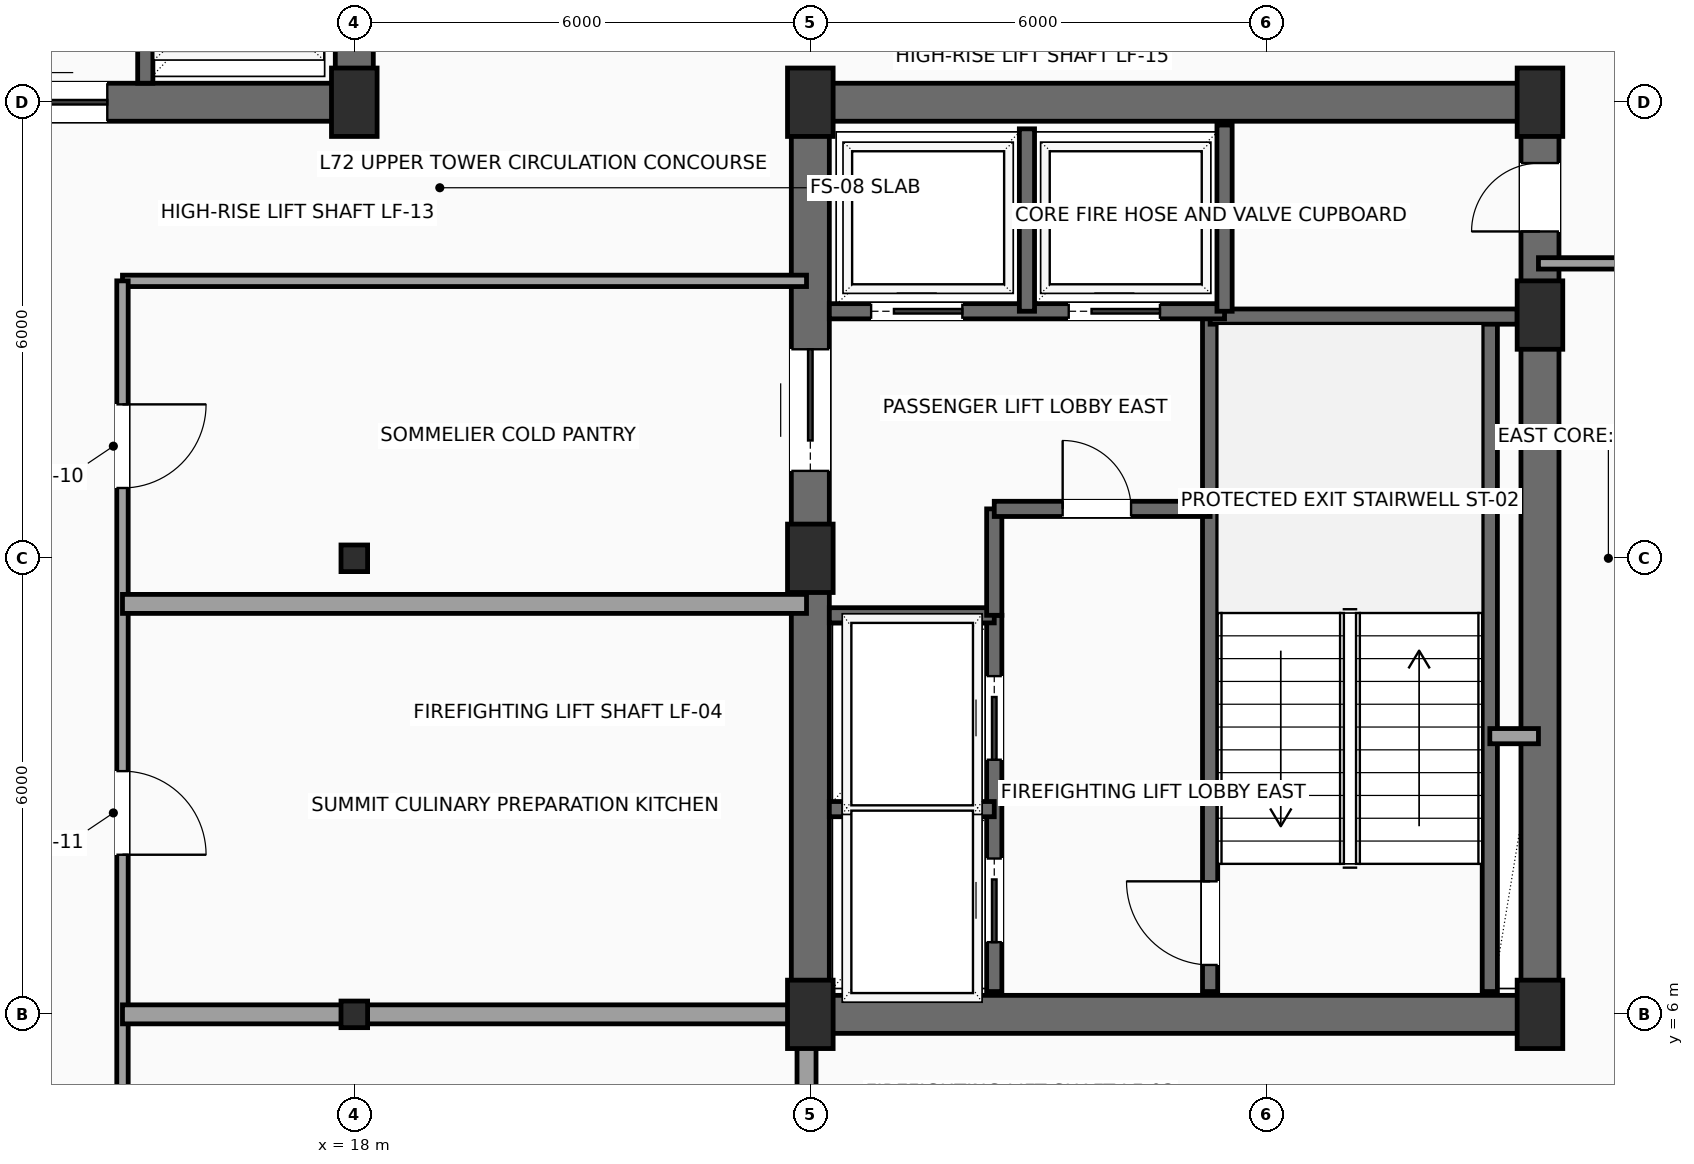
"""IFC4 building model, lengths in metres.
Left out: names, types, materials, properties, quantities, classifications, styles, units other than length and angle.
Written with IfcOpenShell. Run it as: python <this file> out.ifc"""

import sys

from ifc_helpers import new_model, si_unit, direction, frame, frame_2d, origin, origin_2d, place, context, subcontext, project, spatial, rectangle, hollow_rectangle, extrude, element, fill, save


model = new_model("IFC4")
c1 = context("Model", 3, precision=1e-05, world=origin(), true_north=direction((0.0, 1.0)))
c2 = subcontext(c1, "Body", "Model", "MODEL_VIEW")
j1 = project(units=[si_unit("LENGTHUNIT", "METRE"), si_unit("PLANEANGLEUNIT", "RADIAN")], contexts=[c1])
p1 = place(None, origin())
s1 = spatial("IfcSite", under=j1, at=p1, CompositionType="ELEMENT")
p2 = place(p1, origin())
s2 = spatial("IfcBuilding", under=s1, at=p2, CompositionType="ELEMENT")
p3 = place(p2, frame((0.0, 0.0, 285.2)))
s3 = spatial("IfcBuildingStorey", under=s2, at=p3, CompositionType="ELEMENT", Elevation=285.2)
for number, where, z_axis, x_axis in (
    (1, (18.0, 18.0, 0.0), (0.0, 0.0, 1.0), (1.0, 0.0, 0.0)),
    (2, (24.0, 6.0, 0.0), (0.0, 0.0, 1.0), (1.0, 0.0, 0.0)),
    (3, (24.0, 12.0, 0.0), (0.0, 0.0, 1.0), (1.0, 0.0, 0.0)),
    (4, (24.0, 18.0, 0.0), (0.0, 0.0, 1.0), (1.0, 0.0, 0.0)),
    (5, (33.6, 6.0, 0.0), (0.0, 0.0, 1.0), (1.0, 0.0, 0.0)),
    (6, (33.6, 15.2, 0.0), (0.0, 0.0, 1.0), (1.0, 0.0, 0.0)),
    (7, (33.6, 18.0, 0.0), (0.0, 0.0, 1.0), (1.0, 0.0, 0.0)),
):
    element("IfcColumn", number, at=place(p3, frame(where, z_axis=z_axis, x_axis=x_axis)), inside=s3, PredefinedType="COLUMN", context=c2, shape_type="SweptSolid", body=[
        extrude(rectangle(XDim=0.6, YDim=0.9, at=origin_2d()), origin(), (0.0, 0.0, 1.0), 3.5),
    ])
for number, where, z_axis, x_axis in (
    (8, (18.0, 6.0, 0.0), (0.0, 0.0, 1.0), (1.0, 0.0, 0.0)),
    (9, (18.0, 12.0, 0.0), (0.0, 0.0, 1.0), (1.0, 0.0, 0.0)),
):
    element("IfcColumn", number, at=place(p3, frame(where, z_axis=z_axis, x_axis=x_axis)), inside=s3, PredefinedType="COLUMN", context=c2, shape_type="SweptSolid", body=[
        extrude(hollow_rectangle(XDim=0.35, YDim=0.35, WallThickness=0.016, InnerFilletRadius=0.016, OuterFilletRadius=0.032, at=origin_2d()), origin(), (0.0, 0.0, 1.0), 3.5),
    ])
p4 = place(p3, frame((6.0, 18.0, 0.0), z_axis=(0.0, 0.0, 1.0), x_axis=(1.0, 0.0, 0.0)))
e10 = element("IfcWall", 10, at=p4, inside=s3, PredefinedType="SHEAR", context=c2, shape_type="SweptSolid", body=[
    extrude(rectangle(XDim=12.0, YDim=0.5, at=frame_2d((6.0, 0.0))), origin(), (0.0, 0.0, 1.0), 3.3),
])
p5 = place(p4, frame((7.15, 0.0, 0.0)))
e11 = element("IfcOpeningElement", 11, at=p5, cuts=e10, PredefinedType="OPENING", context=c2, shape_type="SweptSolid", body=[
    extrude(rectangle(XDim=1.6, YDim=2.3, at=frame_2d((0.8, 1.15))), frame((0.0, 0.26, 0.0), z_axis=(0.0, -1.0, 0.0), x_axis=(1.0, 0.0, 0.0)), (0.0, 0.0, 1.0), 0.52),
])
for number, where, z_axis, x_axis in (
    (12, (18.0, 18.0, 0.0), (0.0, 0.0, 1.0), (0.0, 1.0, 0.0)),
    (13, (24.0, 6.0, 0.0), (0.0, 0.0, 1.0), (1.0, 0.0, 0.0)),
    (14, (24.0, 18.0, 0.0), (0.0, 0.0, 1.0), (1.0, 0.0, 0.0)),
):
    element("IfcWall", number, at=place(p3, frame(where, z_axis=z_axis, x_axis=x_axis)), inside=s3, PredefinedType="SHEAR", context=c2, shape_type="SweptSolid", body=[
        extrude(rectangle(XDim=9.6, YDim=0.5, at=frame_2d((4.8, 0.0))), origin(), (0.0, 0.0, 1.0), 3.3),
    ])
p6 = place(p3, frame((24.0, 6.0, 0.0), z_axis=(0.0, 0.0, 1.0), x_axis=(0.0, 1.0, 0.0)))
e15 = element("IfcWall", 15, at=p6, inside=s3, PredefinedType="SHEAR", context=c2, shape_type="SweptSolid", body=[
    extrude(rectangle(XDim=12.0, YDim=0.5, at=frame_2d((6.0, 0.0))), origin(), (0.0, 0.0, 1.0), 3.3),
])
p7 = place(p6, frame((7.15, 0.0, 0.0)))
e16 = element("IfcOpeningElement", 16, at=p7, cuts=e15, PredefinedType="OPENING", context=c2, shape_type="SweptSolid", body=[
    extrude(rectangle(XDim=1.6, YDim=2.3, at=frame_2d((0.8, 1.15))), frame((0.0, 0.26, 0.0), z_axis=(0.0, -1.0, 0.0), x_axis=(1.0, 0.0, 0.0)), (0.0, 0.0, 1.0), 0.52),
])
p8 = place(p3, frame((33.6, 6.0, 0.0), z_axis=(0.0, 0.0, 1.0), x_axis=(0.0, 1.0, 0.0)))
e17 = element("IfcWall", 17, at=p8, inside=s3, PredefinedType="SHEAR", context=c2, shape_type="SweptSolid", body=[
    extrude(rectangle(XDim=12.0, YDim=0.5, at=frame_2d((6.0, 0.0))), origin(), (0.0, 0.0, 1.0), 3.3),
])
p9 = place(p8, frame((10.3, 0.0, 0.0)))
e18 = element("IfcOpeningElement", 18, at=p9, cuts=e17, PredefinedType="OPENING", context=c2, shape_type="SweptSolid", body=[
    extrude(rectangle(XDim=0.9, YDim=2.15, at=frame_2d((0.45, 1.075))), frame((0.0, 0.26, 0.0), z_axis=(0.0, -1.0, 0.0), x_axis=(1.0, 0.0, 0.0)), (0.0, 0.0, 1.0), 0.52),
])
p10 = place(p3, frame((29.26, 6.3, 0.0), z_axis=(0.0, 0.0, 1.0), x_axis=(0.0, 1.0, 0.0)))
e19 = element("IfcWall", 19, at=p10, inside=s3, PredefinedType="SHEAR", context=c2, shape_type="SweptSolid", body=[
    extrude(rectangle(XDim=8.88, YDim=0.2, at=frame_2d((4.44, 0.0))), origin(), (0.0, 0.0, 1.0), 3.3),
])
p11 = place(p10, frame((0.35, 0.0, 0.0)))
e20 = element("IfcOpeningElement", 20, at=p11, cuts=e19, PredefinedType="OPENING", context=c2, shape_type="SweptSolid", body=[
    extrude(rectangle(XDim=1.1, YDim=2.2, at=frame_2d((0.55, 1.1))), frame((0.0, 0.11, 0.0), z_axis=(0.0, -1.0, 0.0), x_axis=(1.0, 0.0, 0.0)), (0.0, 0.0, 1.0), 0.22),
])
p12 = place(p3, frame((32.94, 6.3, 0.0), z_axis=(0.0, 0.0, 1.0), x_axis=(0.0, 1.0, 0.0)))
e21 = element("IfcWall", 21, at=p12, inside=s3, PredefinedType="SHEAR", context=c2, shape_type="SweptSolid", body=[
    extrude(rectangle(XDim=8.88, YDim=0.2, at=frame_2d((4.44, 0.0))), origin(), (0.0, 0.0, 1.0), 3.3),
])
p13 = place(p3, frame((29.26, 15.18, 0.0), z_axis=(0.0, 0.0, 1.0), x_axis=(1.0, 0.0, 0.0)))
e22 = element("IfcWall", 22, at=p13, inside=s3, PredefinedType="SHEAR", context=c2, shape_type="SweptSolid", body=[
    extrude(rectangle(XDim=4.04, YDim=0.2, at=frame_2d((2.02, 0.0))), origin(), (0.0, 0.0, 1.0), 3.3),
])
p14 = place(p3, frame((26.42, 6.3, 0.0), z_axis=(0.0, 0.0, 1.0), x_axis=(0.0, 1.0, 0.0)))
e23 = element("IfcWall", 23, at=p14, inside=s3, PredefinedType="SHEAR", context=c2, shape_type="SweptSolid", body=[
    extrude(rectangle(XDim=4.95, YDim=0.2, at=frame_2d((2.475, 0.0))), origin(), (0.0, 0.0, 1.0), 3.3),
])
p15 = place(p14, frame((0.65, 0.0, 0.0)))
e24 = element("IfcOpeningElement", 24, at=p15, cuts=e23, PredefinedType="OPENING", context=c2, shape_type="SweptSolid", body=[
    extrude(rectangle(XDim=1.1, YDim=2.2, at=frame_2d((0.55, 1.1))), frame((0.0, 0.11, 0.0), z_axis=(0.0, -1.0, 0.0), x_axis=(1.0, 0.0, 0.0)), (0.0, 0.0, 1.0), 0.22),
])
p16 = place(p14, frame((3.05, 0.0, 0.0)))
e25 = element("IfcOpeningElement", 25, at=p16, cuts=e23, PredefinedType="OPENING", context=c2, shape_type="SweptSolid", body=[
    extrude(rectangle(XDim=1.1, YDim=2.2, at=frame_2d((0.55, 1.1))), frame((0.0, 0.11, 0.0), z_axis=(0.0, -1.0, 0.0), x_axis=(1.0, 0.0, 0.0)), (0.0, 0.0, 1.0), 0.22),
])
for number, where, z_axis, x_axis in (
    (26, (24.25, 8.7, 0.0), (0.0, 0.0, 1.0), (1.0, 0.0, 0.0)),
    (27, (24.25, 11.25, 0.0), (0.0, 0.0, 1.0), (1.0, 0.0, 0.0)),
):
    element("IfcWall", number, at=place(p3, frame(where, z_axis=z_axis, x_axis=x_axis)), inside=s3, PredefinedType="SHEAR", context=c2, shape_type="SweptSolid", body=[
        extrude(rectangle(XDim=2.17, YDim=0.2, at=frame_2d((1.085, 0.0))), origin(), (0.0, 0.0, 1.0), 3.3),
    ])
p17 = place(p3, frame((26.42, 11.25, 0.0), z_axis=(0.0, 0.0, 1.0), x_axis=(0.0, 1.0, 0.0)))
e28 = element("IfcWall", 28, at=p17, inside=s3, PredefinedType="SHEAR", context=c2, shape_type="SweptSolid", body=[
    extrude(rectangle(XDim=1.4, YDim=0.2, at=frame_2d((0.7, 0.0))), origin(), (0.0, 0.0, 1.0), 3.3),
])
p18 = place(p3, frame((26.42, 12.65, 0.0), z_axis=(0.0, 0.0, 1.0), x_axis=(1.0, 0.0, 0.0)))
e29 = element("IfcWall", 29, at=p18, inside=s3, PredefinedType="SHEAR", context=c2, shape_type="SweptSolid", body=[
    extrude(rectangle(XDim=2.84, YDim=0.2, at=frame_2d((1.42, 0.0))), origin(), (0.0, 0.0, 1.0), 3.3),
])
p19 = place(p18, frame((0.9, 0.0, 0.0)))
e30 = element("IfcOpeningElement", 30, at=p19, cuts=e29, PredefinedType="OPENING", context=c2, shape_type="SweptSolid", body=[
    extrude(rectangle(XDim=0.9, YDim=2.15, at=frame_2d((0.45, 1.075))), frame((0.0, 0.11, 0.0), z_axis=(0.0, -1.0, 0.0), x_axis=(1.0, 0.0, 0.0)), (0.0, 0.0, 1.0), 0.22),
])
p20 = place(p3, frame((32.94, 9.66, 0.0), z_axis=(0.0, 0.0, 1.0), x_axis=(1.0, 0.0, 0.0)))
e31 = element("IfcWall", 31, at=p20, inside=s3, PredefinedType="SOLIDWALL", context=c2, shape_type="SweptSolid", body=[
    extrude(rectangle(XDim=0.64, YDim=0.2, at=frame_2d((0.32, 0.0))), origin(), (0.0, 0.0, 1.0), 3.3),
])
p21 = place(p3, frame((15.25, 18.25, 0.0), z_axis=(0.0, 0.0, 1.0), x_axis=(0.0, 1.0, 0.0)))
e32 = element("IfcWall", 32, at=p21, inside=s3, PredefinedType="SHEAR", context=c2, shape_type="SweptSolid", body=[
    extrude(rectangle(XDim=5.2, YDim=0.2, at=frame_2d((2.6, 0.0))), origin(), (0.0, 0.0, 1.0), 3.3),
])
p22 = place(p21, frame((0.55, 0.0, 0.0)))
e33 = element("IfcOpeningElement", 33, at=p22, cuts=e32, PredefinedType="OPENING", context=c2, shape_type="SweptSolid", body=[
    extrude(rectangle(XDim=1.2, YDim=2.2, at=frame_2d((0.6, 1.1))), frame((0.0, 0.11, 0.0), z_axis=(0.0, -1.0, 0.0), x_axis=(1.0, 0.0, 0.0)), (0.0, 0.0, 1.0), 0.22),
])
p23 = place(p21, frame((3.15, 0.0, 0.0)))
e34 = element("IfcOpeningElement", 34, at=p23, cuts=e32, PredefinedType="OPENING", context=c2, shape_type="SweptSolid", body=[
    extrude(rectangle(XDim=1.2, YDim=2.2, at=frame_2d((0.6, 1.1))), frame((0.0, 0.11, 0.0), z_axis=(0.0, -1.0, 0.0), x_axis=(1.0, 0.0, 0.0)), (0.0, 0.0, 1.0), 0.22),
])
p24 = place(p3, frame((24.25, 15.25, 0.0), z_axis=(0.0, 0.0, 1.0), x_axis=(1.0, 0.0, 0.0)))
e35 = element("IfcWall", 35, at=p24, inside=s3, PredefinedType="SHEAR", context=c2, shape_type="SweptSolid", body=[
    extrude(rectangle(XDim=5.2, YDim=0.2, at=frame_2d((2.6, 0.0))), origin(), (0.0, 0.0, 1.0), 3.3),
])
p25 = place(p24, frame((0.55, 0.0, 0.0)))
e36 = element("IfcOpeningElement", 36, at=p25, cuts=e35, PredefinedType="OPENING", context=c2, shape_type="SweptSolid", body=[
    extrude(rectangle(XDim=1.2, YDim=2.2, at=frame_2d((0.6, 1.1))), frame((0.0, 0.11, 0.0), z_axis=(0.0, -1.0, 0.0), x_axis=(1.0, 0.0, 0.0)), (0.0, 0.0, 1.0), 0.22),
])
p26 = place(p24, frame((3.15, 0.0, 0.0)))
e37 = element("IfcOpeningElement", 37, at=p26, cuts=e35, PredefinedType="OPENING", context=c2, shape_type="SweptSolid", body=[
    extrude(rectangle(XDim=1.2, YDim=2.2, at=frame_2d((0.6, 1.1))), frame((0.0, 0.11, 0.0), z_axis=(0.0, -1.0, 0.0), x_axis=(1.0, 0.0, 0.0)), (0.0, 0.0, 1.0), 0.22),
])
p27 = place(p3, frame((26.85, 15.25, 0.0), z_axis=(0.0, 0.0, 1.0), x_axis=(0.0, 1.0, 0.0)))
e38 = element("IfcWall", 38, at=p27, inside=s3, PredefinedType="SHEAR", context=c2, shape_type="SweptSolid", body=[
    extrude(rectangle(XDim=2.4, YDim=0.2, at=frame_2d((1.2, 0.0))), origin(), (0.0, 0.0, 1.0), 3.3),
])
p28 = place(p3, frame((29.45, 15.25, 0.0), z_axis=(0.0, 0.0, 1.0), x_axis=(0.0, 1.0, 0.0)))
e39 = element("IfcWall", 39, at=p28, inside=s3, PredefinedType="SHEAR", context=c2, shape_type="SweptSolid", body=[
    extrude(rectangle(XDim=2.45, YDim=0.2, at=frame_2d((1.225, 0.0))), origin(), (0.0, 0.0, 1.0), 3.3),
])
p29 = place(p3, frame((35.7, 15.88, 0.0), z_axis=(0.0, 0.0, 1.0), x_axis=(-1.0, 0.0, 0.0)))
e40 = element("IfcWall", 40, at=p29, inside=s3, PredefinedType="PARTITIONING", context=c2, shape_type="SweptSolid", body=[
    extrude(rectangle(XDim=2.12, YDim=0.15, at=frame_2d((1.06, 0.0))), origin(), (0.0, 0.0, 1.0), 3.3),
])
p30 = place(p3, frame((23.95, 15.65, 0.0), z_axis=(0.0, 0.0, 1.0), x_axis=(-1.0, 0.0, 0.0)))
e41 = element("IfcWall", 41, at=p30, inside=s3, PredefinedType="PARTITIONING", context=c2, shape_type="SweptSolid", body=[
    extrude(rectangle(XDim=9.0, YDim=0.15, at=frame_2d((4.5, 0.0))), origin(), (0.0, 0.0, 1.0), 3.3),
])
p31 = place(p3, frame((14.95, 15.65, 0.0), z_axis=(0.0, 0.0, 1.0), x_axis=(0.0, -1.0, 0.0)))
e42 = element("IfcWall", 42, at=p31, inside=s3, PredefinedType="PARTITIONING", context=c2, shape_type="SweptSolid", body=[
    extrude(rectangle(XDim=13.85, YDim=0.15, at=frame_2d((6.925, 0.0))), origin(), (0.0, 0.0, 1.0), 3.3),
])
p32 = place(p31, frame((11.25, 0.0, 0.0)))
e43 = element("IfcOpeningElement", 43, at=p32, cuts=e42, PredefinedType="OPENING", context=c2, shape_type="SweptSolid", body=[
    extrude(rectangle(XDim=1.1, YDim=2.25, at=frame_2d((0.55, 1.125))), frame((0.0, 0.085, 0.0), z_axis=(0.0, -1.0, 0.0), x_axis=(1.0, 0.0, 0.0)), (0.0, 0.0, 1.0), 0.17),
])
p33 = place(p31, frame((6.45, 0.0, 0.0)))
e44 = element("IfcOpeningElement", 44, at=p33, cuts=e42, PredefinedType="OPENING", context=c2, shape_type="SweptSolid", body=[
    extrude(rectangle(XDim=1.1, YDim=2.25, at=frame_2d((0.55, 1.125))), frame((0.0, 0.085, 0.0), z_axis=(0.0, -1.0, 0.0), x_axis=(1.0, 0.0, 0.0)), (0.0, 0.0, 1.0), 0.17),
])
p34 = place(p31, frame((1.625, 0.0, 0.0)))
e45 = element("IfcOpeningElement", 45, at=p34, cuts=e42, PredefinedType="OPENING", context=c2, shape_type="SweptSolid", body=[
    extrude(rectangle(XDim=1.1, YDim=2.25, at=frame_2d((0.55, 1.125))), frame((0.0, 0.085, 0.0), z_axis=(0.0, -1.0, 0.0), x_axis=(1.0, 0.0, 0.0)), (0.0, 0.0, 1.0), 0.17),
])
p35 = place(p3, frame((14.95, 6.0, 0.0), z_axis=(0.0, 0.0, 1.0), x_axis=(1.0, 0.0, 0.0)))
e46 = element("IfcWall", 46, at=p35, inside=s3, PredefinedType="PARTITIONING", context=c2, shape_type="SweptSolid", body=[
    extrude(rectangle(XDim=9.0, YDim=0.25, at=frame_2d((4.5, 0.0))), origin(), (0.0, 0.0, 1.0), 2.992),
])
p36 = place(p3, frame((23.95, 0.3, 0.0), z_axis=(0.0, 0.0, 1.0), x_axis=(0.0, 1.0, 0.0)))
e47 = element("IfcWall", 47, at=p36, inside=s3, PredefinedType="PARTITIONING", context=c2, shape_type="SweptSolid", body=[
    extrude(rectangle(XDim=5.7, YDim=0.25, at=frame_2d((2.85, 0.0))), origin(), (0.0, 0.0, 1.0), 2.967),
])
p37 = place(p3, frame((14.95, 11.4, 0.0), z_axis=(0.0, 0.0, 1.0), x_axis=(1.0, 0.0, 0.0)))
e48 = element("IfcWall", 48, at=p37, inside=s3, PredefinedType="PARTITIONING", context=c2, shape_type="SweptSolid", body=[
    extrude(rectangle(XDim=9.0, YDim=0.25, at=frame_2d((4.5, 0.0))), origin(), (0.0, 0.0, 1.0), 3.3),
])
p38 = place(p5, origin())
e49 = element("IfcDoor", 49, at=p38, inside=s3, OperationType="DOUBLE_DOOR_SLIDING", PredefinedType="DOOR", context=c2, shape_type="SweptSolid", body=[
    extrude(rectangle(XDim=1.6, YDim=2.3, at=frame_2d((0.8, 1.15))), frame((0.0, 0.025, 0.0), z_axis=(0.0, -1.0, 0.0), x_axis=(1.0, 0.0, 0.0)), (0.0, 0.0, 1.0), 0.05),
])
fill(e11, e49)
p39 = place(p7, origin())
e50 = element("IfcDoor", 50, at=p39, inside=s3, OperationType="DOUBLE_DOOR_SLIDING", PredefinedType="DOOR", context=c2, shape_type="SweptSolid", body=[
    extrude(rectangle(XDim=1.6, YDim=2.3, at=frame_2d((0.8, 1.15))), frame((0.0, 0.025, 0.0), z_axis=(0.0, -1.0, 0.0), x_axis=(1.0, 0.0, 0.0)), (0.0, 0.0, 1.0), 0.05),
])
fill(e16, e50)
p40 = place(p9, origin())
e51 = element("IfcDoor", 51, at=p40, inside=s3, OperationType="SINGLE_SWING_LEFT", PredefinedType="DOOR", context=c2, shape_type="SweptSolid", body=[
    extrude(rectangle(XDim=0.9, YDim=2.15, at=frame_2d((0.45, 1.075))), frame((0.0, 0.025, 0.0), z_axis=(0.0, -1.0, 0.0), x_axis=(1.0, 0.0, 0.0)), (0.0, 0.0, 1.0), 0.05),
])
fill(e18, e51)
p41 = place(p11, origin())
e52 = element("IfcDoor", 52, at=p41, inside=s3, OperationType="SINGLE_SWING_RIGHT", PredefinedType="DOOR", context=c2, shape_type="SweptSolid", body=[
    extrude(rectangle(XDim=1.1, YDim=2.2, at=frame_2d((0.55, 1.1))), frame((0.0, 0.025, 0.0), z_axis=(0.0, -1.0, 0.0), x_axis=(1.0, 0.0, 0.0)), (0.0, 0.0, 1.0), 0.05),
])
fill(e20, e52)
p42 = place(p15, origin())
e53 = element("IfcDoor", 53, at=p42, inside=s3, OperationType="SLIDING_TO_LEFT", PredefinedType="DOOR", context=c2, shape_type="SweptSolid", body=[
    extrude(rectangle(XDim=1.1, YDim=2.2, at=frame_2d((0.55, 1.1))), frame((0.0, 0.025, 0.0), z_axis=(0.0, -1.0, 0.0), x_axis=(1.0, 0.0, 0.0)), (0.0, 0.0, 1.0), 0.05),
])
fill(e24, e53)
p43 = place(p16, origin())
e54 = element("IfcDoor", 54, at=p43, inside=s3, OperationType="SLIDING_TO_LEFT", PredefinedType="DOOR", context=c2, shape_type="SweptSolid", body=[
    extrude(rectangle(XDim=1.1, YDim=2.2, at=frame_2d((0.55, 1.1))), frame((0.0, 0.025, 0.0), z_axis=(0.0, -1.0, 0.0), x_axis=(1.0, 0.0, 0.0)), (0.0, 0.0, 1.0), 0.05),
])
fill(e25, e54)
p44 = place(p19, origin())
e55 = element("IfcDoor", 55, at=p44, inside=s3, OperationType="SINGLE_SWING_LEFT", PredefinedType="DOOR", context=c2, shape_type="SweptSolid", body=[
    extrude(rectangle(XDim=0.9, YDim=2.15, at=frame_2d((0.45, 1.075))), frame((0.0, 0.025, 0.0), z_axis=(0.0, -1.0, 0.0), x_axis=(1.0, 0.0, 0.0)), (0.0, 0.0, 1.0), 0.05),
])
fill(e30, e55)
p45 = place(p25, origin())
e56 = element("IfcDoor", 56, at=p45, inside=s3, OperationType="SLIDING_TO_RIGHT", PredefinedType="DOOR", context=c2, shape_type="SweptSolid", body=[
    extrude(rectangle(XDim=1.2, YDim=2.2, at=frame_2d((0.6, 1.1))), frame((0.0, 0.025, 0.0), z_axis=(0.0, -1.0, 0.0), x_axis=(1.0, 0.0, 0.0)), (0.0, 0.0, 1.0), 0.05),
])
fill(e36, e56)
p46 = place(p26, origin())
e57 = element("IfcDoor", 57, at=p46, inside=s3, OperationType="SLIDING_TO_RIGHT", PredefinedType="DOOR", context=c2, shape_type="SweptSolid", body=[
    extrude(rectangle(XDim=1.2, YDim=2.2, at=frame_2d((0.6, 1.1))), frame((0.0, 0.025, 0.0), z_axis=(0.0, -1.0, 0.0), x_axis=(1.0, 0.0, 0.0)), (0.0, 0.0, 1.0), 0.05),
])
fill(e37, e57)
p47 = place(p33, origin())
e58 = element("IfcDoor", 58, at=p47, inside=s3, OperationType="SINGLE_SWING_RIGHT", PredefinedType="DOOR", context=c2, shape_type="SweptSolid", body=[
    extrude(rectangle(XDim=1.1, YDim=2.25, at=frame_2d((0.55, 1.125))), frame((0.0, 0.025, 0.0), z_axis=(0.0, -1.0, 0.0), x_axis=(1.0, 0.0, 0.0)), (0.0, 0.0, 1.0), 0.05),
])
fill(e44, e58)
p48 = place(p34, origin())
e59 = element("IfcDoor", 59, at=p48, inside=s3, OperationType="SINGLE_SWING_LEFT", PredefinedType="DOOR", context=c2, shape_type="SweptSolid", body=[
    extrude(rectangle(XDim=1.1, YDim=2.25, at=frame_2d((0.55, 1.125))), frame((0.0, 0.025, 0.0), z_axis=(0.0, -1.0, 0.0), x_axis=(1.0, 0.0, 0.0)), (0.0, 0.0, 1.0), 0.05),
])
fill(e45, e59)
save(model, sys.argv[1])
